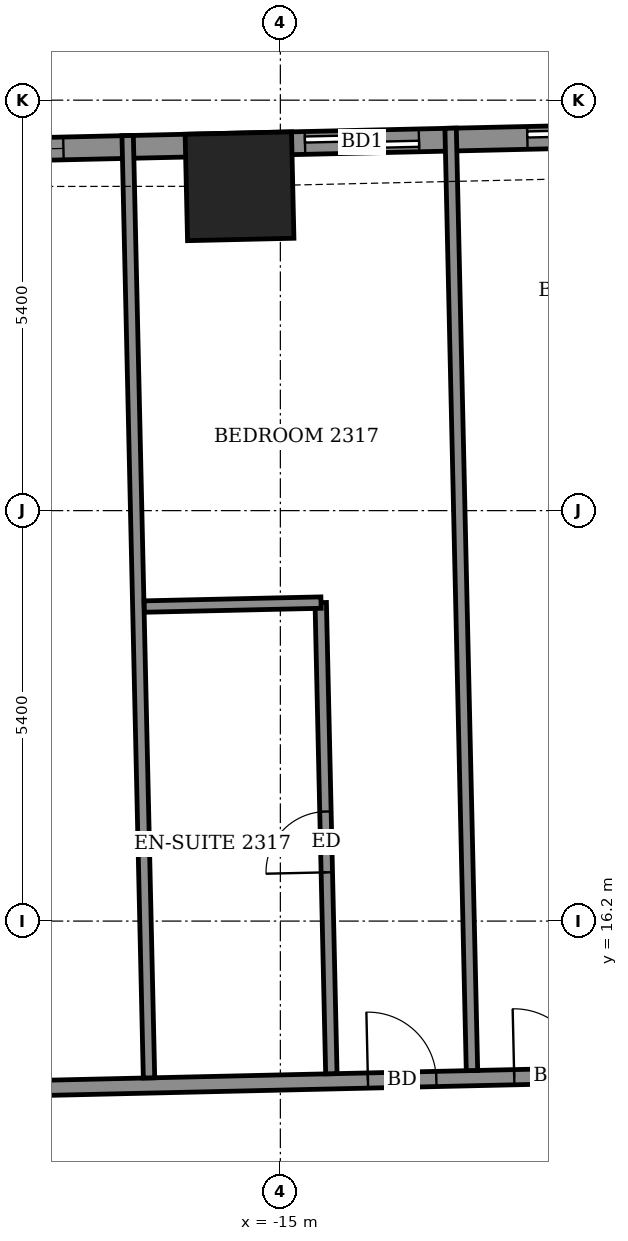
"""IFC4 building model, lengths in metres.
Left out: names, types, materials, properties, quantities, classifications, styles, units other than length and angle.
Written with IfcOpenShell. Run it as: python <this file> out.ifc"""

import sys

from ifc_helpers import new_model, si_unit, direction, frame, frame_2d, origin, origin_2d, place, context, subcontext, project, spatial, rectangle, extrude, element, fill, save


model = new_model("IFC4")
c1 = context("Model", 3, precision=1e-05, world=origin(), true_north=direction((0.0, 1.0)))
c2 = subcontext(c1, "Body", "Model", "MODEL_VIEW")
j1 = project(units=[si_unit("LENGTHUNIT", "METRE"), si_unit("PLANEANGLEUNIT", "RADIAN")], contexts=[c1])
p1 = place(None, origin())
s1 = spatial("IfcSite", under=j1, at=p1, CompositionType="ELEMENT")
p2 = place(p1, origin())
s2 = spatial("IfcBuilding", under=s1, at=p2, CompositionType="ELEMENT")
p3 = place(p2, frame((0.0, 0.0, 93.7)))
s3 = spatial("IfcBuildingStorey", under=s2, at=p3, CompositionType="ELEMENT", Elevation=93.7)
p4 = place(p3, frame((-15.537, 25.867, -0.55), z_axis=(0.0, 0.0, 1.0), x_axis=(-0.999743323945, -0.022655821028, 0.0)))
e1 = element("IfcColumn", 1, at=p4, inside=s3, PredefinedType="COLUMN", context=c2, shape_type="SweptSolid", body=[
    extrude(rectangle(XDim=1.4, YDim=1.4, at=origin_2d()), origin(), (0.0, 0.0, 1.0), 3.6),
])
p5 = place(p3, frame((24.809, 27.333, 0.0), z_axis=(0.0, 0.0, 1.0), x_axis=(-0.999742676884, -0.022684356233, 0.0)))
e2 = element("IfcWall", 2, at=p5, inside=s3, PredefinedType="SOLIDWALL", context=c2, shape_type="SweptSolid", body=[
    extrude(rectangle(XDim=47.301, YDim=0.3, at=frame_2d((23.651, 0.0))), origin(), (0.0, 0.0, 1.0), 3.05),
])
p6 = place(p5, frame((1.311, 0.0, 0.0)))
e3 = element("IfcOpeningElement", 3, at=p6, cuts=e2, PredefinedType="OPENING", context=c2, shape_type="SweptSolid", body=[
    extrude(rectangle(XDim=1.2, YDim=2.4, at=frame_2d((0.6, 1.2))), frame((0.0, 0.16, 0.0), z_axis=(0.0, -1.0, 0.0), x_axis=(1.0, 0.0, 0.0)), (0.0, 0.0, 1.0), 0.32),
])
p7 = place(p5, frame((3.763, 0.0, 0.0)))
e4 = element("IfcOpeningElement", 4, at=p7, cuts=e2, PredefinedType="OPENING", context=c2, shape_type="SweptSolid", body=[
    extrude(rectangle(XDim=1.5, YDim=2.4, at=frame_2d((0.75, 1.2))), frame((0.0, 0.16, 0.0), z_axis=(0.0, -1.0, 0.0), x_axis=(1.0, 0.0, 0.0)), (0.0, 0.0, 1.0), 0.32),
])
p8 = place(p5, frame((8.647, 0.0, 0.0)))
e5 = element("IfcOpeningElement", 5, at=p8, cuts=e2, PredefinedType="OPENING", context=c2, shape_type="SweptSolid", body=[
    extrude(rectangle(XDim=1.5, YDim=2.4, at=frame_2d((0.75, 1.2))), frame((0.0, 0.16, 0.0), z_axis=(0.0, -1.0, 0.0), x_axis=(1.0, 0.0, 0.0)), (0.0, 0.0, 1.0), 0.32),
])
p9 = place(p5, frame((14.239, 0.0, 0.0)))
e6 = element("IfcOpeningElement", 6, at=p9, cuts=e2, PredefinedType="OPENING", context=c2, shape_type="SweptSolid", body=[
    extrude(rectangle(XDim=1.2, YDim=2.4, at=frame_2d((0.6, 1.2))), frame((0.0, 0.16, 0.0), z_axis=(0.0, -1.0, 0.0), x_axis=(1.0, 0.0, 0.0)), (0.0, 0.0, 1.0), 0.32),
])
p10 = place(p5, frame((17.016, 0.0, 0.0)))
e7 = element("IfcOpeningElement", 7, at=p10, cuts=e2, PredefinedType="OPENING", context=c2, shape_type="SweptSolid", body=[
    extrude(rectangle(XDim=1.5, YDim=2.4, at=frame_2d((0.75, 1.2))), frame((0.0, 0.16, 0.0), z_axis=(0.0, -1.0, 0.0), x_axis=(1.0, 0.0, 0.0)), (0.0, 0.0, 1.0), 0.32),
])
p11 = place(p5, frame((21.816, 0.0, 0.0)))
e8 = element("IfcOpeningElement", 8, at=p11, cuts=e2, PredefinedType="OPENING", context=c2, shape_type="SweptSolid", body=[
    extrude(rectangle(XDim=1.5, YDim=2.4, at=frame_2d((0.75, 1.2))), frame((0.0, 0.16, 0.0), z_axis=(0.0, -1.0, 0.0), x_axis=(1.0, 0.0, 0.0)), (0.0, 0.0, 1.0), 0.32),
])
p12 = place(p5, frame((24.817, 0.0, 0.0)))
e9 = element("IfcOpeningElement", 9, at=p12, cuts=e2, PredefinedType="OPENING", context=c2, shape_type="SweptSolid", body=[
    extrude(rectangle(XDim=1.2, YDim=2.4, at=frame_2d((0.6, 1.2))), frame((0.0, 0.16, 0.0), z_axis=(0.0, -1.0, 0.0), x_axis=(1.0, 0.0, 0.0)), (0.0, 0.0, 1.0), 0.32),
])
p13 = place(p5, frame((30.244, 0.0, 0.0)))
e10 = element("IfcOpeningElement", 10, at=p13, cuts=e2, PredefinedType="OPENING", context=c2, shape_type="SweptSolid", body=[
    extrude(rectangle(XDim=1.5, YDim=2.4, at=frame_2d((0.75, 1.2))), frame((0.0, 0.16, 0.0), z_axis=(0.0, -1.0, 0.0), x_axis=(1.0, 0.0, 0.0)), (0.0, 0.0, 1.0), 0.32),
])
p14 = place(p5, frame((35.069, 0.0, 0.0)))
e11 = element("IfcOpeningElement", 11, at=p14, cuts=e2, PredefinedType="OPENING", context=c2, shape_type="SweptSolid", body=[
    extrude(rectangle(XDim=1.5, YDim=2.4, at=frame_2d((0.75, 1.2))), frame((0.0, 0.16, 0.0), z_axis=(0.0, -1.0, 0.0), x_axis=(1.0, 0.0, 0.0)), (0.0, 0.0, 1.0), 0.32),
])
p15 = place(p5, frame((37.995, 0.0, 0.0)))
e12 = element("IfcOpeningElement", 12, at=p15, cuts=e2, PredefinedType="OPENING", context=c2, shape_type="SweptSolid", body=[
    extrude(rectangle(XDim=1.5, YDim=2.4, at=frame_2d((0.75, 1.2))), frame((0.0, 0.16, 0.0), z_axis=(0.0, -1.0, 0.0), x_axis=(1.0, 0.0, 0.0)), (0.0, 0.0, 1.0), 0.32),
])
p16 = place(p5, frame((42.674, 0.0, 0.9)))
e13 = element("IfcOpeningElement", 13, at=p16, cuts=e2, PredefinedType="OPENING", context=c2, shape_type="SweptSolid", body=[
    extrude(rectangle(XDim=2.4, YDim=1.5, at=frame_2d((1.2, 0.75))), frame((0.0, 0.16, 0.0), z_axis=(0.0, -1.0, 0.0), x_axis=(1.0, 0.0, 0.0)), (0.0, 0.0, 1.0), 0.32),
])
p17 = place(p3, frame((-24.92, 13.851, 0.0), z_axis=(0.0, 0.0, 1.0), x_axis=(0.999742411711, 0.022696039895, 0.0)))
e14 = element("IfcWall", 14, at=p17, inside=s3, PredefinedType="PARTITIONING", context=c2, shape_type="SweptSolid", body=[
    extrude(rectangle(XDim=52.472, YDim=0.2, at=frame_2d((26.236, 0.0))), origin(), (0.0, 0.0, 1.0), 3.05),
])
p18 = place(p17, frame((50.088, 0.0, 0.0)))
e15 = element("IfcOpeningElement", 15, at=p18, cuts=e14, PredefinedType="OPENING", context=c2, shape_type="SweptSolid", body=[
    extrude(rectangle(XDim=1.0, YDim=2.1, at=frame_2d((0.5, 1.05))), frame((0.0, 0.11, 0.0), z_axis=(0.0, -1.0, 0.0), x_axis=(1.0, 0.0, 0.0)), (0.0, 0.0, 1.0), 0.22),
])
p19 = place(p17, frame((45.725, 0.0, 0.0)))
e16 = element("IfcOpeningElement", 16, at=p19, cuts=e14, PredefinedType="OPENING", context=c2, shape_type="SweptSolid", body=[
    extrude(rectangle(XDim=0.9, YDim=2.1, at=frame_2d((0.45, 1.05))), frame((0.0, 0.11, 0.0), z_axis=(0.0, -1.0, 0.0), x_axis=(1.0, 0.0, 0.0)), (0.0, 0.0, 1.0), 0.22),
])
p20 = place(p17, frame((38.975, 0.0, 0.0)))
e17 = element("IfcOpeningElement", 17, at=p20, cuts=e14, PredefinedType="OPENING", context=c2, shape_type="SweptSolid", body=[
    extrude(rectangle(XDim=0.9, YDim=2.1, at=frame_2d((0.45, 1.05))), frame((0.0, 0.11, 0.0), z_axis=(0.0, -1.0, 0.0), x_axis=(1.0, 0.0, 0.0)), (0.0, 0.0, 1.0), 0.22),
])
p21 = place(p17, frame((37.05, 0.0, 0.0)))
e18 = element("IfcOpeningElement", 18, at=p21, cuts=e14, PredefinedType="OPENING", context=c2, shape_type="SweptSolid", body=[
    extrude(rectangle(XDim=0.9, YDim=2.1, at=frame_2d((0.45, 1.05))), frame((0.0, 0.11, 0.0), z_axis=(0.0, -1.0, 0.0), x_axis=(1.0, 0.0, 0.0)), (0.0, 0.0, 1.0), 0.22),
])
p22 = place(p17, frame((30.35, 0.0, 0.0)))
e19 = element("IfcOpeningElement", 19, at=p22, cuts=e14, PredefinedType="OPENING", context=c2, shape_type="SweptSolid", body=[
    extrude(rectangle(XDim=0.9, YDim=2.1, at=frame_2d((0.45, 1.05))), frame((0.0, 0.11, 0.0), z_axis=(0.0, -1.0, 0.0), x_axis=(1.0, 0.0, 0.0)), (0.0, 0.0, 1.0), 0.22),
])
p23 = place(p17, frame((28.4, 0.0, 0.0)))
e20 = element("IfcOpeningElement", 20, at=p23, cuts=e14, PredefinedType="OPENING", context=c2, shape_type="SweptSolid", body=[
    extrude(rectangle(XDim=0.9, YDim=2.1, at=frame_2d((0.45, 1.05))), frame((0.0, 0.11, 0.0), z_axis=(0.0, -1.0, 0.0), x_axis=(1.0, 0.0, 0.0)), (0.0, 0.0, 1.0), 0.22),
])
p24 = place(p17, frame((21.675, 0.0, 0.0)))
e21 = element("IfcOpeningElement", 21, at=p24, cuts=e14, PredefinedType="OPENING", context=c2, shape_type="SweptSolid", body=[
    extrude(rectangle(XDim=0.9, YDim=2.1, at=frame_2d((0.45, 1.05))), frame((0.0, 0.11, 0.0), z_axis=(0.0, -1.0, 0.0), x_axis=(1.0, 0.0, 0.0)), (0.0, 0.0, 1.0), 0.22),
])
p25 = place(p17, frame((19.775, 0.0, 0.0)))
e22 = element("IfcOpeningElement", 22, at=p25, cuts=e14, PredefinedType="OPENING", context=c2, shape_type="SweptSolid", body=[
    extrude(rectangle(XDim=0.9, YDim=2.1, at=frame_2d((0.45, 1.05))), frame((0.0, 0.11, 0.0), z_axis=(0.0, -1.0, 0.0), x_axis=(1.0, 0.0, 0.0)), (0.0, 0.0, 1.0), 0.22),
])
p26 = place(p17, frame((13.0, 0.0, 0.0)))
e23 = element("IfcOpeningElement", 23, at=p26, cuts=e14, PredefinedType="OPENING", context=c2, shape_type="SweptSolid", body=[
    extrude(rectangle(XDim=0.9, YDim=2.1, at=frame_2d((0.45, 1.05))), frame((0.0, 0.11, 0.0), z_axis=(0.0, -1.0, 0.0), x_axis=(1.0, 0.0, 0.0)), (0.0, 0.0, 1.0), 0.22),
])
p27 = place(p17, frame((11.075, 0.0, 0.0)))
e24 = element("IfcOpeningElement", 24, at=p27, cuts=e14, PredefinedType="OPENING", context=c2, shape_type="SweptSolid", body=[
    extrude(rectangle(XDim=0.9, YDim=2.1, at=frame_2d((0.45, 1.05))), frame((0.0, 0.11, 0.0), z_axis=(0.0, -1.0, 0.0), x_axis=(1.0, 0.0, 0.0)), (0.0, 0.0, 1.0), 0.22),
])
p28 = place(p17, frame((3.049, 0.0, 0.0)))
e25 = element("IfcOpeningElement", 25, at=p28, cuts=e14, PredefinedType="OPENING", context=c2, shape_type="SweptSolid", body=[
    extrude(rectangle(XDim=1.0, YDim=2.1, at=frame_2d((0.5, 1.05))), frame((0.0, 0.11, 0.0), z_axis=(0.0, -1.0, 0.0), x_axis=(1.0, 0.0, 0.0)), (0.0, 0.0, 1.0), 0.22),
])
p29 = place(p3, frame((-16.728, 14.137, 0.0), z_axis=(0.0, 0.0, 1.0), x_axis=(-0.022661475803, 0.999743195783, 0.0)))
e26 = element("IfcWall", 26, at=p29, inside=s3, PredefinedType="PARTITIONING", context=c2, shape_type="SweptSolid", body=[
    extrude(rectangle(XDim=12.4, YDim=0.15, at=frame_2d((6.2, 0.0))), origin(), (0.0, 0.0, 1.0), 2.55),
])
p30 = place(p3, frame((-14.329, 14.192, 0.0), z_axis=(0.0, 0.0, 1.0), x_axis=(-0.022564860101, 0.999745381129, 0.0)))
e27 = element("IfcWall", 27, at=p30, inside=s3, PredefinedType="PARTITIONING", context=c2, shape_type="SweptSolid", body=[
    extrude(rectangle(XDim=6.199, YDim=0.15, at=frame_2d((3.1, 0.0))), origin(), (0.0, 0.0, 1.0), 3.05),
])
p31 = place(p30, frame((2.65, 0.0, 0.0)))
e28 = element("IfcOpeningElement", 28, at=p31, cuts=e27, PredefinedType="OPENING", context=c2, shape_type="SweptSolid", body=[
    extrude(rectangle(XDim=0.8, YDim=2.1, at=frame_2d((0.4, 1.05))), frame((0.0, 0.085, 0.0), z_axis=(0.0, -1.0, 0.0), x_axis=(1.0, 0.0, 0.0)), (0.0, 0.0, 1.0), 0.17),
])
p32 = place(p3, frame((-12.479, 14.234, 0.0), z_axis=(0.0, 0.0, 1.0), x_axis=(-0.022661029756, 0.999743205894, 0.0)))
e29 = element("IfcWall", 29, at=p32, inside=s3, PredefinedType="PARTITIONING", context=c2, shape_type="SweptSolid", body=[
    extrude(rectangle(XDim=12.4, YDim=0.15, at=frame_2d((6.2, 0.0))), origin(), (0.0, 0.0, 1.0), 2.55),
])
p33 = place(p3, frame((-16.79, 20.338, 0.0), z_axis=(0.0, 0.0, 1.0), x_axis=(0.999749954681, 0.022361308448, 0.0)))
e30 = element("IfcWall", 30, at=p33, inside=s3, PredefinedType="PARTITIONING", context=c2, shape_type="SweptSolid", body=[
    extrude(rectangle(XDim=2.325, YDim=0.15, at=frame_2d((1.163, 0.0))), origin(), (0.0, 0.0, 1.0), 3.05),
])
p34 = place(p14, origin())
e31 = element("IfcDoor", 31, at=p34, inside=s3, OperationType="SLIDING_TO_LEFT", PredefinedType="DOOR", context=c2, shape_type="SweptSolid", body=[
    extrude(rectangle(XDim=1.5, YDim=2.4, at=frame_2d((0.75, 1.2))), frame((0.0, 0.025, 0.0), z_axis=(0.0, -1.0, 0.0), x_axis=(1.0, 0.0, 0.0)), (0.0, 0.0, 1.0), 0.05),
])
fill(e11, e31)
p35 = place(p15, origin())
e32 = element("IfcDoor", 32, at=p35, inside=s3, OperationType="SLIDING_TO_LEFT", PredefinedType="DOOR", context=c2, shape_type="SweptSolid", body=[
    extrude(rectangle(XDim=1.5, YDim=2.4, at=frame_2d((0.75, 1.2))), frame((0.0, 0.025, 0.0), z_axis=(0.0, -1.0, 0.0), x_axis=(1.0, 0.0, 0.0)), (0.0, 0.0, 1.0), 0.05),
])
fill(e12, e32)
p36 = place(p16, origin())
e33 = element("IfcWindow", 33, at=p36, inside=s3, PartitioningType="DOUBLE_PANEL_VERTICAL", PredefinedType="WINDOW", context=c2, shape_type="SweptSolid", body=[
    extrude(rectangle(XDim=2.4, YDim=1.5, at=frame_2d((1.2, 0.75))), frame((0.0, 0.03, 0.0), z_axis=(0.0, -1.0, 0.0), x_axis=(1.0, 0.0, 0.0)), (0.0, 0.0, 1.0), 0.06),
])
fill(e13, e33)
p37 = place(p26, origin())
e34 = element("IfcDoor", 34, at=p37, inside=s3, OperationType="SINGLE_SWING_RIGHT", PredefinedType="DOOR", context=c2, shape_type="SweptSolid", body=[
    extrude(rectangle(XDim=0.9, YDim=2.1, at=frame_2d((0.45, 1.05))), frame((0.0, 0.025, 0.0), z_axis=(0.0, -1.0, 0.0), x_axis=(1.0, 0.0, 0.0)), (0.0, 0.0, 1.0), 0.05),
])
fill(e23, e34)
p38 = place(p27, origin())
e35 = element("IfcDoor", 35, at=p38, inside=s3, OperationType="SINGLE_SWING_LEFT", PredefinedType="DOOR", context=c2, shape_type="SweptSolid", body=[
    extrude(rectangle(XDim=0.9, YDim=2.1, at=frame_2d((0.45, 1.05))), frame((0.0, 0.025, 0.0), z_axis=(0.0, -1.0, 0.0), x_axis=(1.0, 0.0, 0.0)), (0.0, 0.0, 1.0), 0.05),
])
fill(e24, e35)
p39 = place(p31, origin())
e36 = element("IfcDoor", 36, at=p39, inside=s3, OperationType="SINGLE_SWING_LEFT", PredefinedType="DOOR", context=c2, shape_type="SweptSolid", body=[
    extrude(rectangle(XDim=0.8, YDim=2.1, at=frame_2d((0.4, 1.05))), frame((0.0, 0.025, 0.0), z_axis=(0.0, -1.0, 0.0), x_axis=(1.0, 0.0, 0.0)), (0.0, 0.0, 1.0), 0.05),
])
fill(e28, e36)
save(model, sys.argv[1])
